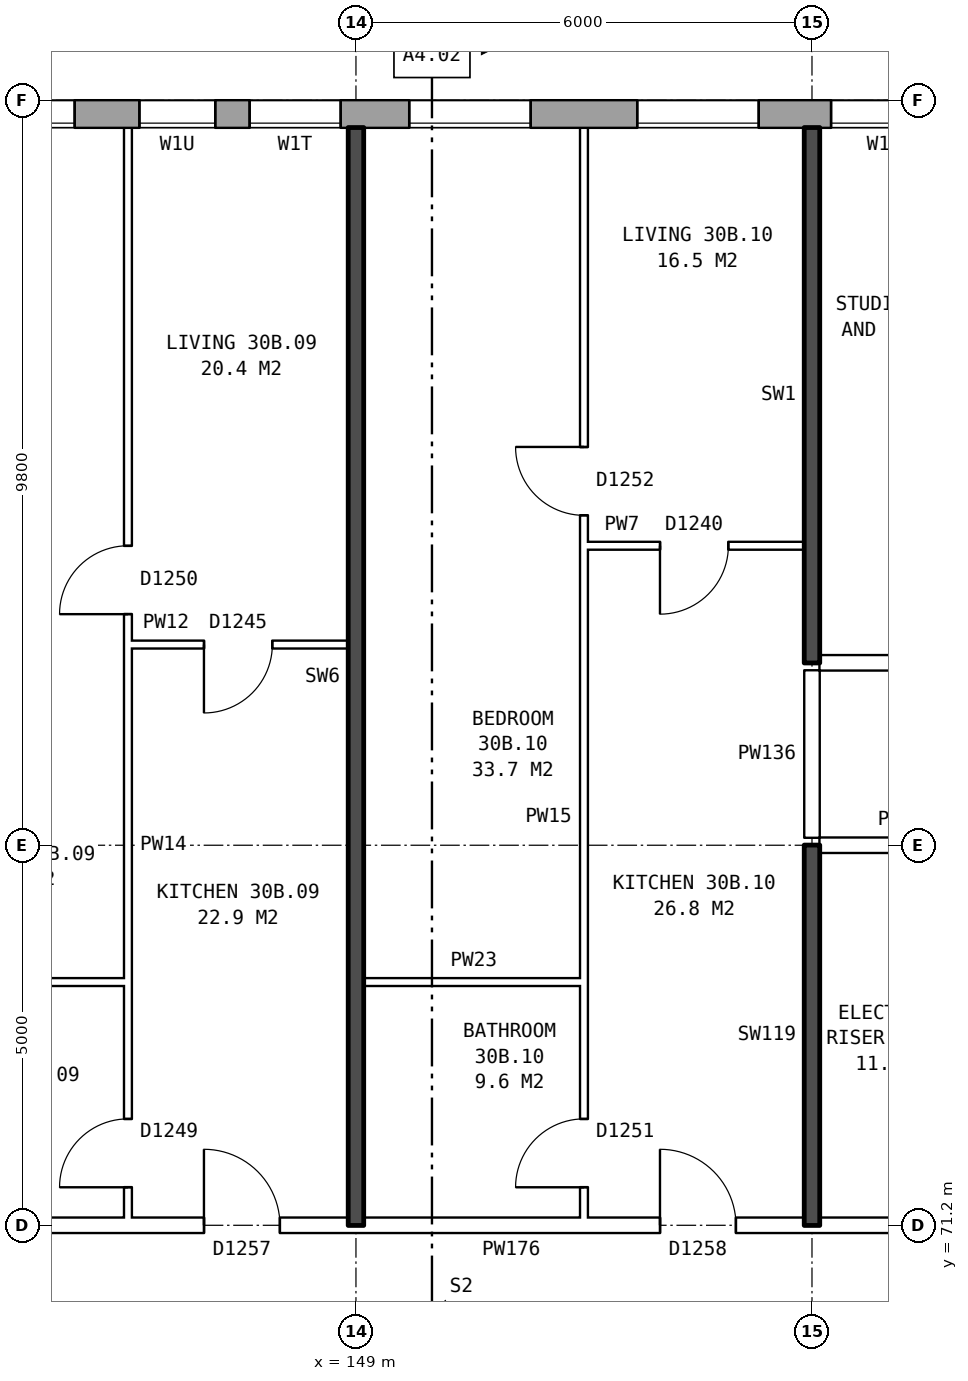
"""IFC4 building model, lengths in metres.
Left out: names, types, materials, properties, quantities, classifications, styles, units other than length and angle.
Written with IfcOpenShell. Run it as: python <this file> out.ifc"""

import sys

from ifc_helpers import new_model, si_unit, direction, frame, frame_2d, origin, place, context, subcontext, project, spatial, rectangle, extrude, element, fill, save


model = new_model("IFC4")
c1 = context("Model", 3, precision=1e-05, world=origin(), true_north=direction((0.0, 1.0)))
c2 = subcontext(c1, "Body", "Model", "MODEL_VIEW")
j1 = project(units=[si_unit("LENGTHUNIT", "METRE"), si_unit("PLANEANGLEUNIT", "RADIAN")], contexts=[c1])
p1 = place(None, origin())
s1 = spatial("IfcSite", under=j1, at=p1, CompositionType="ELEMENT")
p2 = place(p1, origin())
s2 = spatial("IfcBuilding", under=s1, at=p2, CompositionType="ELEMENT")
p3 = place(p2, frame((0.0, 0.0, 108.8)))
s3 = spatial("IfcBuildingStorey", under=s2, at=p3, CompositionType="ELEMENT", Elevation=108.8)
p4 = place(p3, frame((170.925, 85.82, 0.0), z_axis=(0.0, 0.0, 1.0), x_axis=(-1.0, 0.0, 0.0)))
e1 = element("IfcWall", 1, at=p4, inside=s3, PredefinedType="STANDARD", context=c2, shape_type="SweptSolid", body=[
    extrude(rectangle(XDim=36.851, YDim=0.36, at=frame_2d((18.425, 0.0))), origin(), (0.0, 0.0, 1.0), 2.85),
])
p5 = place(p4, frame((1.625, 0.0, 0.8)))
e2 = element("IfcOpeningElement", 2, at=p5, cuts=e1, PredefinedType="OPENING", context=c2, shape_type="SweptSolid", body=[
    extrude(rectangle(XDim=1.6, YDim=1.8, at=frame_2d((0.8, 0.9))), frame((0.0, 0.19, 0.0), z_axis=(0.0, -1.0, 0.0), x_axis=(1.0, 0.0, 0.0)), (0.0, 0.0, 1.0), 0.38),
])
p6 = place(p4, frame((4.625, 0.0, 0.8)))
e3 = element("IfcOpeningElement", 3, at=p6, cuts=e1, PredefinedType="OPENING", context=c2, shape_type="SweptSolid", body=[
    extrude(rectangle(XDim=1.6, YDim=1.8, at=frame_2d((0.8, 0.9))), frame((0.0, 0.19, 0.0), z_axis=(0.0, -1.0, 0.0), x_axis=(1.0, 0.0, 0.0)), (0.0, 0.0, 1.0), 0.38),
])
p7 = place(p4, frame((7.625, 0.0, 0.8)))
e4 = element("IfcOpeningElement", 4, at=p7, cuts=e1, PredefinedType="OPENING", context=c2, shape_type="SweptSolid", body=[
    extrude(rectangle(XDim=1.6, YDim=1.8, at=frame_2d((0.8, 0.9))), frame((0.0, 0.19, 0.0), z_axis=(0.0, -1.0, 0.0), x_axis=(1.0, 0.0, 0.0)), (0.0, 0.0, 1.0), 0.38),
])
p8 = place(p4, frame((10.625, 0.0, 0.8)))
e5 = element("IfcOpeningElement", 5, at=p8, cuts=e1, PredefinedType="OPENING", context=c2, shape_type="SweptSolid", body=[
    extrude(rectangle(XDim=1.6, YDim=1.8, at=frame_2d((0.8, 0.9))), frame((0.0, 0.19, 0.0), z_axis=(0.0, -1.0, 0.0), x_axis=(1.0, 0.0, 0.0)), (0.0, 0.0, 1.0), 0.38),
])
p9 = place(p4, frame((12.525, 0.0, 1.7)))
e6 = element("IfcOpeningElement", 6, at=p9, cuts=e1, PredefinedType="OPENING", context=c2, shape_type="SweptSolid", body=[
    extrude(rectangle(XDim=0.6, YDim=0.9, at=frame_2d((0.3, 0.45))), frame((0.0, 0.19, 0.0), z_axis=(0.0, -1.0, 0.0), x_axis=(1.0, 0.0, 0.0)), (0.0, 0.0, 1.0), 0.38),
])
p10 = place(p4, frame((16.625, 0.0, 0.8)))
e7 = element("IfcOpeningElement", 7, at=p10, cuts=e1, PredefinedType="OPENING", context=c2, shape_type="SweptSolid", body=[
    extrude(rectangle(XDim=1.6, YDim=1.8, at=frame_2d((0.8, 0.9))), frame((0.0, 0.19, 0.0), z_axis=(0.0, -1.0, 0.0), x_axis=(1.0, 0.0, 0.0)), (0.0, 0.0, 1.0), 0.38),
])
p11 = place(p4, frame((19.625, 0.0, 0.8)))
e8 = element("IfcOpeningElement", 8, at=p11, cuts=e1, PredefinedType="OPENING", context=c2, shape_type="SweptSolid", body=[
    extrude(rectangle(XDim=1.6, YDim=1.8, at=frame_2d((0.8, 0.9))), frame((0.0, 0.19, 0.0), z_axis=(0.0, -1.0, 0.0), x_axis=(1.0, 0.0, 0.0)), (0.0, 0.0, 1.0), 0.38),
])
p12 = place(p4, frame((22.125, 0.0, 0.15)))
e9 = element("IfcOpeningElement", 9, at=p12, cuts=e1, PredefinedType="OPENING", context=c2, shape_type="SweptSolid", body=[
    extrude(rectangle(XDim=1.2, YDim=0.9, at=frame_2d((0.6, 0.45))), frame((0.0, 0.19, 0.0), z_axis=(0.0, -1.0, 0.0), x_axis=(1.0, 0.0, 0.0)), (0.0, 0.0, 1.0), 0.38),
])
p13 = place(p4, frame((25.625, 0.0, 0.8)))
e10 = element("IfcOpeningElement", 10, at=p13, cuts=e1, PredefinedType="OPENING", context=c2, shape_type="SweptSolid", body=[
    extrude(rectangle(XDim=1.6, YDim=1.8, at=frame_2d((0.8, 0.9))), frame((0.0, 0.19, 0.0), z_axis=(0.0, -1.0, 0.0), x_axis=(1.0, 0.0, 0.0)), (0.0, 0.0, 1.0), 0.38),
])
p14 = place(p4, frame((28.625, 0.0, 0.8)))
e11 = element("IfcOpeningElement", 11, at=p14, cuts=e1, PredefinedType="OPENING", context=c2, shape_type="SweptSolid", body=[
    extrude(rectangle(XDim=1.6, YDim=1.8, at=frame_2d((0.8, 0.9))), frame((0.0, 0.19, 0.0), z_axis=(0.0, -1.0, 0.0), x_axis=(1.0, 0.0, 0.0)), (0.0, 0.0, 1.0), 0.38),
])
p15 = place(p4, frame((31.625, 0.0, 0.8)))
e12 = element("IfcOpeningElement", 12, at=p15, cuts=e1, PredefinedType="OPENING", context=c2, shape_type="SweptSolid", body=[
    extrude(rectangle(XDim=1.6, YDim=1.8, at=frame_2d((0.8, 0.9))), frame((0.0, 0.19, 0.0), z_axis=(0.0, -1.0, 0.0), x_axis=(1.0, 0.0, 0.0)), (0.0, 0.0, 1.0), 0.38),
])
p16 = place(p4, frame((34.625, 0.0, 0.8)))
e13 = element("IfcOpeningElement", 13, at=p16, cuts=e1, PredefinedType="OPENING", context=c2, shape_type="SweptSolid", body=[
    extrude(rectangle(XDim=1.6, YDim=1.8, at=frame_2d((0.8, 0.9))), frame((0.0, 0.19, 0.0), z_axis=(0.0, -1.0, 0.0), x_axis=(1.0, 0.0, 0.0)), (0.0, 0.0, 1.0), 0.38),
])
p17 = place(p4, frame((14.275, 0.0, 0.8)))
e14 = element("IfcOpeningElement", 14, at=p17, cuts=e1, PredefinedType="OPENING", context=c2, shape_type="SweptSolid", body=[
    extrude(rectangle(XDim=1.4, YDim=0.9, at=frame_2d((0.7, 0.45))), frame((0.0, 0.19, 0.0), z_axis=(0.0, -1.0, 0.0), x_axis=(1.0, 0.0, 0.0)), (0.0, 0.0, 1.0), 0.38),
])
p18 = place(p4, frame((23.775, 0.0, 1.65)))
e15 = element("IfcOpeningElement", 15, at=p18, cuts=e1, PredefinedType="OPENING", context=c2, shape_type="SweptSolid", body=[
    extrude(rectangle(XDim=1.0, YDim=0.9, at=frame_2d((0.5, 0.45))), frame((0.0, 0.19, 0.0), z_axis=(0.0, -1.0, 0.0), x_axis=(1.0, 0.0, 0.0)), (0.0, 0.0, 1.0), 0.38),
])
p19 = place(p3, frame((142.76, 71.2, 0.0), z_axis=(0.0, 0.0, 1.0), x_axis=(1.0, 0.0, 0.0)))
e16 = element("IfcWall", 16, at=p19, inside=s3, PredefinedType="PARTITIONING", context=c2, shape_type="SweptSolid", body=[
    extrude(rectangle(XDim=14.48, YDim=0.2, at=frame_2d((7.24, 0.0))), origin(), (0.0, 0.0, 1.0), 2.85),
])
p20 = place(p19, frame((4.24, 0.0, 0.0)))
e17 = element("IfcOpeningElement", 17, at=p20, cuts=e16, PredefinedType="OPENING", context=c2, shape_type="SweptSolid", body=[
    extrude(rectangle(XDim=1.0, YDim=2.1, at=frame_2d((0.5, 1.05))), frame((0.0, 0.11, 0.0), z_axis=(0.0, -1.0, 0.0), x_axis=(1.0, 0.0, 0.0)), (0.0, 0.0, 1.0), 0.22),
])
p21 = place(p19, frame((10.24, 0.0, 0.0)))
e18 = element("IfcOpeningElement", 18, at=p21, cuts=e16, PredefinedType="OPENING", context=c2, shape_type="SweptSolid", body=[
    extrude(rectangle(XDim=1.0, YDim=2.1, at=frame_2d((0.5, 1.05))), frame((0.0, 0.11, 0.0), z_axis=(0.0, -1.0, 0.0), x_axis=(1.0, 0.0, 0.0)), (0.0, 0.0, 1.0), 0.22),
])
p22 = place(p3, frame((142.76, 74.4, 0.0), z_axis=(0.0, 0.0, 1.0), x_axis=(1.0, 0.0, 0.0)))
e19 = element("IfcWall", 19, at=p22, inside=s3, PredefinedType="PARTITIONING", context=c2, shape_type="SweptSolid", body=[
    extrude(rectangle(XDim=3.24, YDim=0.1, at=frame_2d((1.62, 0.0))), origin(), (0.0, 0.0, 1.0), 2.85),
])
p23 = place(p3, frame((149.1, 74.4, 0.0), z_axis=(0.0, 0.0, 1.0), x_axis=(1.0, 0.0, 0.0)))
e20 = element("IfcWall", 20, at=p23, inside=s3, PredefinedType="PARTITIONING", context=c2, shape_type="SweptSolid", body=[
    extrude(rectangle(XDim=2.9, YDim=0.1, at=frame_2d((1.45, 0.0))), origin(), (0.0, 0.0, 1.0), 2.85),
])
p24 = place(p3, frame((155.1, 76.2, 0.0), z_axis=(0.0, 0.0, 1.0), x_axis=(1.0, 0.0, 0.0)))
e21 = element("IfcWall", 21, at=p24, inside=s3, PredefinedType="PARTITIONING", context=c2, shape_type="SweptSolid", body=[
    extrude(rectangle(XDim=2.14, YDim=0.2, at=frame_2d((1.07, 0.0))), origin(), (0.0, 0.0, 1.0), 2.85),
])
p25 = place(p3, frame((155.1, 78.6, 0.0), z_axis=(0.0, 0.0, 1.0), x_axis=(1.0, 0.0, 0.0)))
e22 = element("IfcWall", 22, at=p25, inside=s3, PredefinedType="PARTITIONING", context=c2, shape_type="SweptSolid", body=[
    extrude(rectangle(XDim=18.54, YDim=0.2, at=frame_2d((9.27, 0.0))), origin(), (0.0, 0.0, 1.0), 2.85),
])
p26 = place(p25, frame((1.45, 0.0, 0.0)))
e23 = element("IfcOpeningElement", 23, at=p26, cuts=e22, PredefinedType="OPENING", context=c2, shape_type="SweptSolid", body=[
    extrude(rectangle(XDim=1.0, YDim=2.1, at=frame_2d((0.5, 1.05))), frame((0.0, 0.11, 0.0), z_axis=(0.0, -1.0, 0.0), x_axis=(1.0, 0.0, 0.0)), (0.0, 0.0, 1.0), 0.22),
])
p27 = place(p25, frame((9.6, 0.0, 0.0)))
e24 = element("IfcOpeningElement", 24, at=p27, cuts=e22, PredefinedType="OPENING", context=c2, shape_type="SweptSolid", body=[
    extrude(rectangle(XDim=1.0, YDim=2.1, at=frame_2d((0.5, 1.05))), frame((0.0, 0.11, 0.0), z_axis=(0.0, -1.0, 0.0), x_axis=(1.0, 0.0, 0.0)), (0.0, 0.0, 1.0), 0.22),
])
p28 = place(p25, frame((15.92, 0.0, 0.0)))
e25 = element("IfcOpeningElement", 25, at=p28, cuts=e22, PredefinedType="OPENING", context=c2, shape_type="SweptSolid", body=[
    extrude(rectangle(XDim=1.0, YDim=2.1, at=frame_2d((0.5, 1.05))), frame((0.0, 0.11, 0.0), z_axis=(0.0, -1.0, 0.0), x_axis=(1.0, 0.0, 0.0)), (0.0, 0.0, 1.0), 0.22),
])
p29 = place(p3, frame((146.0, 78.84, 0.0), z_axis=(0.0, 0.0, 1.0), x_axis=(1.0, 0.0, 0.0)))
e26 = element("IfcWall", 26, at=p29, inside=s3, PredefinedType="PARTITIONING", context=c2, shape_type="SweptSolid", body=[
    extrude(rectangle(XDim=2.9, YDim=0.1, at=frame_2d((1.45, 0.0))), origin(), (0.0, 0.0, 1.0), 2.85),
])
p30 = place(p29, frame((1.0, 0.0, 0.0)))
e27 = element("IfcOpeningElement", 27, at=p30, cuts=e26, PredefinedType="OPENING", context=c2, shape_type="SweptSolid", body=[
    extrude(rectangle(XDim=0.9, YDim=2.1, at=frame_2d((0.45, 1.05))), frame((0.0, 0.06, 0.0), z_axis=(0.0, -1.0, 0.0), x_axis=(1.0, 0.0, 0.0)), (0.0, 0.0, 1.0), 0.12),
])
p31 = place(p3, frame((152.0, 80.14, 0.0), z_axis=(0.0, 0.0, 1.0), x_axis=(1.0, 0.0, 0.0)))
e28 = element("IfcWall", 28, at=p31, inside=s3, PredefinedType="PARTITIONING", context=c2, shape_type="SweptSolid", body=[
    extrude(rectangle(XDim=2.9, YDim=0.1, at=frame_2d((1.45, 0.0))), origin(), (0.0, 0.0, 1.0), 2.85),
])
p32 = place(p31, frame((1.0, 0.0, 0.0)))
e29 = element("IfcOpeningElement", 29, at=p32, cuts=e28, PredefinedType="OPENING", context=c2, shape_type="SweptSolid", body=[
    extrude(rectangle(XDim=0.9, YDim=2.1, at=frame_2d((0.45, 1.05))), frame((0.0, 0.06, 0.0), z_axis=(0.0, -1.0, 0.0), x_axis=(1.0, 0.0, 0.0)), (0.0, 0.0, 1.0), 0.12),
])
p33 = place(p3, frame((146.0, 71.3, 0.0), z_axis=(0.0, 0.0, 1.0), x_axis=(0.0, 1.0, 0.0)))
e30 = element("IfcWall", 30, at=p33, inside=s3, PredefinedType="PARTITIONING", context=c2, shape_type="SweptSolid", body=[
    extrude(rectangle(XDim=14.34, YDim=0.1, at=frame_2d((7.17, 0.0))), origin(), (0.0, 0.0, 1.0), 2.85),
])
p34 = place(p33, frame((7.94, 0.0, 0.0)))
e31 = element("IfcOpeningElement", 31, at=p34, cuts=e30, PredefinedType="OPENING", context=c2, shape_type="SweptSolid", body=[
    extrude(rectangle(XDim=0.9, YDim=2.1, at=frame_2d((0.45, 1.05))), frame((0.0, 0.06, 0.0), z_axis=(0.0, -1.0, 0.0), x_axis=(1.0, 0.0, 0.0)), (0.0, 0.0, 1.0), 0.12),
])
p35 = place(p33, frame((0.4, 0.0, 0.0)))
e32 = element("IfcOpeningElement", 32, at=p35, cuts=e30, PredefinedType="OPENING", context=c2, shape_type="SweptSolid", body=[
    extrude(rectangle(XDim=0.9, YDim=2.1, at=frame_2d((0.45, 1.05))), frame((0.0, 0.06, 0.0), z_axis=(0.0, -1.0, 0.0), x_axis=(1.0, 0.0, 0.0)), (0.0, 0.0, 1.0), 0.12),
])
p36 = place(p3, frame((149.0, 71.2, 0.0), z_axis=(0.0, 0.0, 1.0), x_axis=(0.0, 1.0, 0.0)))
e33 = element("IfcWall", 33, at=p36, inside=s3, PredefinedType="SOLIDWALL", context=c2, shape_type="SweptSolid", body=[
    extrude(rectangle(XDim=14.44, YDim=0.2, at=frame_2d((7.22, 0.0))), origin(), (0.0, 0.0, 1.0), 2.85),
])
p37 = place(p3, frame((152.0, 71.3, 0.0), z_axis=(0.0, 0.0, 1.0), x_axis=(0.0, 1.0, 0.0)))
e34 = element("IfcWall", 34, at=p37, inside=s3, PredefinedType="PARTITIONING", context=c2, shape_type="SweptSolid", body=[
    extrude(rectangle(XDim=14.34, YDim=0.1, at=frame_2d((7.17, 0.0))), origin(), (0.0, 0.0, 1.0), 2.85),
])
p38 = place(p37, frame((9.24, 0.0, 0.0)))
e35 = element("IfcOpeningElement", 35, at=p38, cuts=e34, PredefinedType="OPENING", context=c2, shape_type="SweptSolid", body=[
    extrude(rectangle(XDim=0.9, YDim=2.1, at=frame_2d((0.45, 1.05))), frame((0.0, 0.06, 0.0), z_axis=(0.0, -1.0, 0.0), x_axis=(1.0, 0.0, 0.0)), (0.0, 0.0, 1.0), 0.12),
])
p39 = place(p37, frame((0.4, 0.0, 0.0)))
e36 = element("IfcOpeningElement", 36, at=p39, cuts=e34, PredefinedType="OPENING", context=c2, shape_type="SweptSolid", body=[
    extrude(rectangle(XDim=0.9, YDim=2.1, at=frame_2d((0.45, 1.05))), frame((0.0, 0.06, 0.0), z_axis=(0.0, -1.0, 0.0), x_axis=(1.0, 0.0, 0.0)), (0.0, 0.0, 1.0), 0.12),
])
p40 = place(p3, frame((155.0, 71.2, 0.0), z_axis=(0.0, 0.0, 1.0), x_axis=(0.0, 1.0, 0.0)))
e37 = element("IfcWall", 37, at=p40, inside=s3, PredefinedType="SOLIDWALL", context=c2, shape_type="SweptSolid", body=[
    extrude(rectangle(XDim=5.0, YDim=0.2, at=frame_2d((2.5, 0.0))), origin(), (0.0, 0.0, 1.0), 2.85),
])
p41 = place(p3, frame((155.0, 76.3, 0.0), z_axis=(0.0, 0.0, 1.0), x_axis=(0.0, 1.0, 0.0)))
e38 = element("IfcWall", 38, at=p41, inside=s3, PredefinedType="PARTITIONING", context=c2, shape_type="SweptSolid", body=[
    extrude(rectangle(XDim=2.2, YDim=0.2, at=frame_2d((1.1, 0.0))), origin(), (0.0, 0.0, 1.0), 2.85),
])
p42 = place(p3, frame((155.0, 78.6, 0.0), z_axis=(0.0, 0.0, 1.0), x_axis=(0.0, 1.0, 0.0)))
e39 = element("IfcWall", 39, at=p42, inside=s3, PredefinedType="SOLIDWALL", context=c2, shape_type="SweptSolid", body=[
    extrude(rectangle(XDim=7.04, YDim=0.2, at=frame_2d((3.52, 0.0))), origin(), (0.0, 0.0, 1.0), 2.85),
])
p43 = place(p10, origin())
e40 = element("IfcWindow", 40, at=p43, inside=s3, PartitioningType="SINGLE_PANEL", PredefinedType="WINDOW", context=c2, shape_type="SweptSolid", body=[
    extrude(rectangle(XDim=1.6, YDim=1.8, at=frame_2d((0.8, 0.9))), frame((0.0, 0.15, 0.0), z_axis=(0.0, -1.0, 0.0), x_axis=(1.0, 0.0, 0.0)), (0.0, 0.0, 1.0), 0.06),
])
fill(e7, e40)
p44 = place(p11, origin())
e41 = element("IfcWindow", 41, at=p44, inside=s3, PartitioningType="SINGLE_PANEL", PredefinedType="WINDOW", context=c2, shape_type="SweptSolid", body=[
    extrude(rectangle(XDim=1.6, YDim=1.8, at=frame_2d((0.8, 0.9))), frame((0.0, 0.15, 0.0), z_axis=(0.0, -1.0, 0.0), x_axis=(1.0, 0.0, 0.0)), (0.0, 0.0, 1.0), 0.06),
])
fill(e8, e41)
p45 = place(p12, origin())
e42 = element("IfcWindow", 42, at=p45, inside=s3, PartitioningType="SINGLE_PANEL", PredefinedType="WINDOW", context=c2, shape_type="SweptSolid", body=[
    extrude(rectangle(XDim=1.2, YDim=0.9, at=frame_2d((0.6, 0.45))), frame((0.0, 0.15, 0.0), z_axis=(0.0, -1.0, 0.0), x_axis=(1.0, 0.0, 0.0)), (0.0, 0.0, 1.0), 0.06),
])
fill(e9, e42)
p46 = place(p13, origin())
e43 = element("IfcWindow", 43, at=p46, inside=s3, PartitioningType="SINGLE_PANEL", PredefinedType="WINDOW", context=c2, shape_type="SweptSolid", body=[
    extrude(rectangle(XDim=1.6, YDim=1.8, at=frame_2d((0.8, 0.9))), frame((0.0, 0.15, 0.0), z_axis=(0.0, -1.0, 0.0), x_axis=(1.0, 0.0, 0.0)), (0.0, 0.0, 1.0), 0.06),
])
fill(e10, e43)
p47 = place(p34, origin())
e44 = element("IfcDoor", 44, at=p47, inside=s3, OperationType="SINGLE_SWING_LEFT", PredefinedType="DOOR", context=c2, shape_type="SweptSolid", body=[
    extrude(rectangle(XDim=0.9, YDim=2.1, at=frame_2d((0.45, 1.05))), frame((0.0, 0.025, 0.0), z_axis=(0.0, -1.0, 0.0), x_axis=(1.0, 0.0, 0.0)), (0.0, 0.0, 1.0), 0.05),
])
fill(e31, e44)
p48 = place(p20, origin())
e45 = element("IfcDoor", 45, at=p48, inside=s3, OperationType="SINGLE_SWING_LEFT", PredefinedType="DOOR", context=c2, shape_type="SweptSolid", body=[
    extrude(rectangle(XDim=1.0, YDim=2.1, at=frame_2d((0.5, 1.05))), frame((0.0, 0.025, 0.0), z_axis=(0.0, -1.0, 0.0), x_axis=(1.0, 0.0, 0.0)), (0.0, 0.0, 1.0), 0.05),
])
fill(e17, e45)
p49 = place(p30, frame((0.9, 0.0, 0.0), z_axis=(0.0, 0.0, 1.0), x_axis=(-1.0, 0.0, 0.0)))
e46 = element("IfcDoor", 46, at=p49, inside=s3, OperationType="SINGLE_SWING_RIGHT", PredefinedType="DOOR", context=c2, shape_type="SweptSolid", body=[
    extrude(rectangle(XDim=0.9, YDim=2.1, at=frame_2d((0.45, 1.05))), frame((0.0, 0.025, 0.0), z_axis=(0.0, -1.0, 0.0), x_axis=(1.0, 0.0, 0.0)), (0.0, 0.0, 1.0), 0.05),
])
fill(e27, e46)
p50 = place(p35, origin())
e47 = element("IfcDoor", 47, at=p50, inside=s3, OperationType="SINGLE_SWING_LEFT", PredefinedType="DOOR", context=c2, shape_type="SweptSolid", body=[
    extrude(rectangle(XDim=0.9, YDim=2.1, at=frame_2d((0.45, 1.05))), frame((0.0, 0.025, 0.0), z_axis=(0.0, -1.0, 0.0), x_axis=(1.0, 0.0, 0.0)), (0.0, 0.0, 1.0), 0.05),
])
fill(e32, e47)
p51 = place(p38, origin())
e48 = element("IfcDoor", 48, at=p51, inside=s3, OperationType="SINGLE_SWING_RIGHT", PredefinedType="DOOR", context=c2, shape_type="SweptSolid", body=[
    extrude(rectangle(XDim=0.9, YDim=2.1, at=frame_2d((0.45, 1.05))), frame((0.0, 0.025, 0.0), z_axis=(0.0, -1.0, 0.0), x_axis=(1.0, 0.0, 0.0)), (0.0, 0.0, 1.0), 0.05),
])
fill(e35, e48)
p52 = place(p21, origin())
e49 = element("IfcDoor", 49, at=p52, inside=s3, OperationType="SINGLE_SWING_LEFT", PredefinedType="DOOR", context=c2, shape_type="SweptSolid", body=[
    extrude(rectangle(XDim=1.0, YDim=2.1, at=frame_2d((0.5, 1.05))), frame((0.0, 0.025, 0.0), z_axis=(0.0, -1.0, 0.0), x_axis=(1.0, 0.0, 0.0)), (0.0, 0.0, 1.0), 0.05),
])
fill(e18, e49)
p53 = place(p32, frame((0.9, 0.0, 0.0), z_axis=(0.0, 0.0, 1.0), x_axis=(-1.0, 0.0, 0.0)))
e50 = element("IfcDoor", 50, at=p53, inside=s3, OperationType="SINGLE_SWING_RIGHT", PredefinedType="DOOR", context=c2, shape_type="SweptSolid", body=[
    extrude(rectangle(XDim=0.9, YDim=2.1, at=frame_2d((0.45, 1.05))), frame((0.0, 0.025, 0.0), z_axis=(0.0, -1.0, 0.0), x_axis=(1.0, 0.0, 0.0)), (0.0, 0.0, 1.0), 0.05),
])
fill(e29, e50)
p54 = place(p39, origin())
e51 = element("IfcDoor", 51, at=p54, inside=s3, OperationType="SINGLE_SWING_LEFT", PredefinedType="DOOR", context=c2, shape_type="SweptSolid", body=[
    extrude(rectangle(XDim=0.9, YDim=2.1, at=frame_2d((0.45, 1.05))), frame((0.0, 0.025, 0.0), z_axis=(0.0, -1.0, 0.0), x_axis=(1.0, 0.0, 0.0)), (0.0, 0.0, 1.0), 0.05),
])
fill(e36, e51)
p55 = place(p17, origin())
e52 = element("IfcWindow", 52, at=p55, inside=s3, PartitioningType="SINGLE_PANEL", PredefinedType="WINDOW", context=c2, shape_type="SweptSolid", body=[
    extrude(rectangle(XDim=1.4, YDim=0.9, at=frame_2d((0.7, 0.45))), frame((0.0, 0.15, 0.0), z_axis=(0.0, -1.0, 0.0), x_axis=(1.0, 0.0, 0.0)), (0.0, 0.0, 1.0), 0.06),
])
fill(e14, e52)
p56 = place(p18, origin())
e53 = element("IfcWindow", 53, at=p56, inside=s3, PartitioningType="SINGLE_PANEL", PredefinedType="WINDOW", context=c2, shape_type="SweptSolid", body=[
    extrude(rectangle(XDim=1.0, YDim=0.9, at=frame_2d((0.5, 0.45))), frame((0.0, 0.15, 0.0), z_axis=(0.0, -1.0, 0.0), x_axis=(1.0, 0.0, 0.0)), (0.0, 0.0, 1.0), 0.06),
])
fill(e15, e53)
save(model, sys.argv[1])
